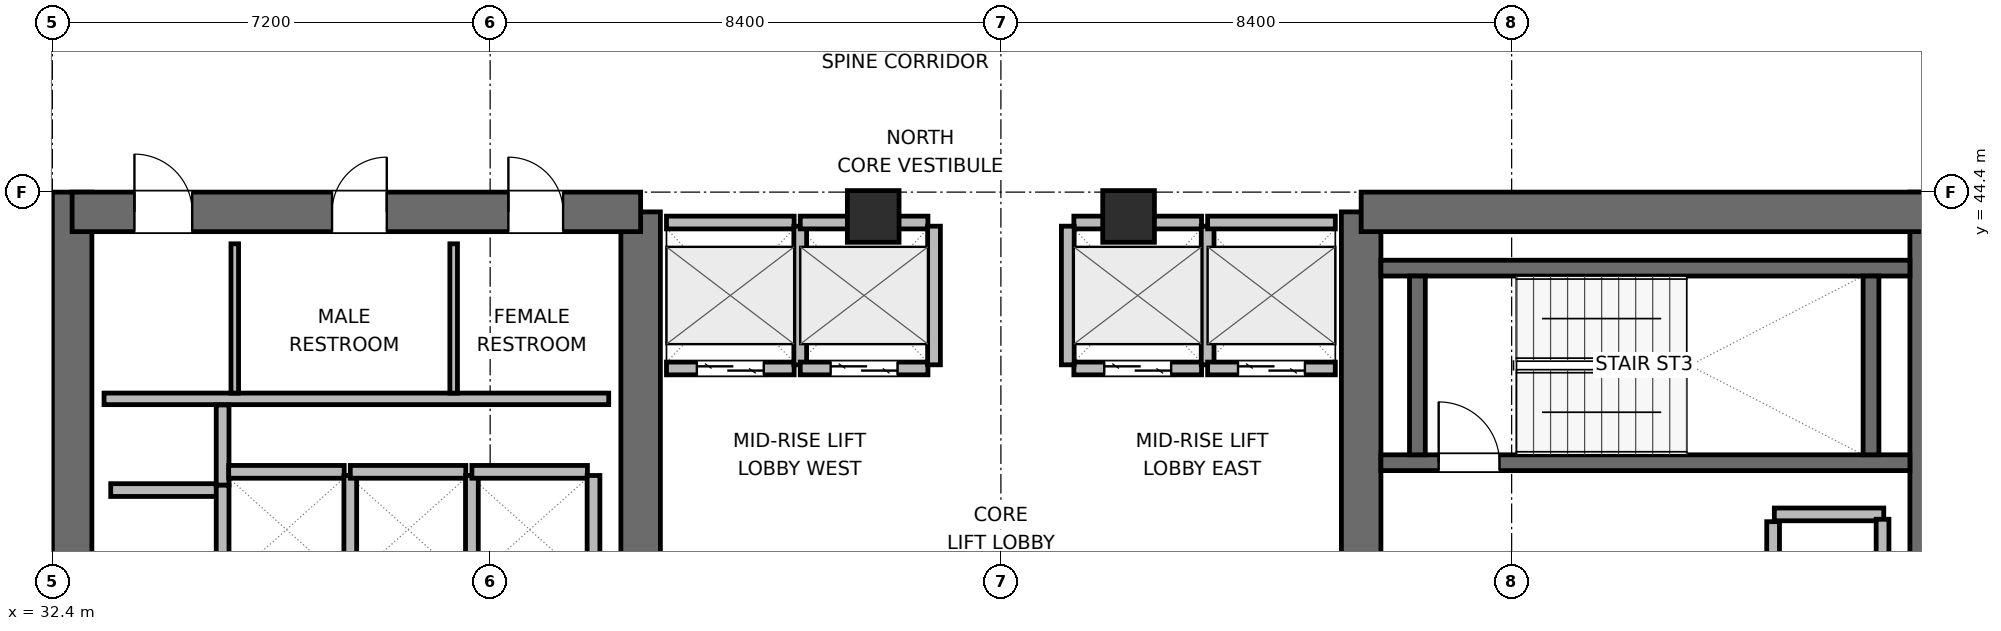
"""IFC4 building model, lengths in metres.
Left out: names, types, materials, properties, quantities, classifications, styles, units other than length and angle.
Written with IfcOpenShell. Run it as: python <this file> out.ifc"""

import sys

from ifc_helpers import new_model, si_unit, direction, frame, frame_2d, origin, origin_2d, place, context, subcontext, project, spatial, rectangle, extrude, element, fill, save


model = new_model("IFC4")
c1 = context("Model", 3, precision=1e-05, world=origin(), true_north=direction((0.0, 1.0)))
c2 = subcontext(c1, "Body", "Model", "MODEL_VIEW")
j1 = project(units=[si_unit("LENGTHUNIT", "METRE"), si_unit("PLANEANGLEUNIT", "RADIAN")], contexts=[c1])
p1 = place(None, origin())
s1 = spatial("IfcSite", under=j1, at=p1, CompositionType="ELEMENT")
p2 = place(p1, origin())
s2 = spatial("IfcBuilding", under=s1, at=p2, CompositionType="ELEMENT")
p3 = place(p2, frame((0.0, 0.0, 190.2)))
s3 = spatial("IfcBuildingStorey", under=s2, at=p3, CompositionType="ELEMENT", Elevation=190.2)
p4 = place(p3, frame((32.725, 27.6, 0.0), z_axis=(0.0, 0.0, 1.0), x_axis=(0.0, 1.0, 0.0)))
e1 = element("IfcWall", 1, at=p4, inside=s3, PredefinedType="SHEAR", context=c2, shape_type="SweptSolid", body=[
    extrude(rectangle(XDim=16.8, YDim=0.65, at=frame_2d((8.4, 0.0))), origin(), (0.0, 0.0, 1.0), 3.9),
])
p5 = place(p3, frame((42.075, 37.8, 0.0), z_axis=(0.0, 0.0, 1.0), x_axis=(0.0, 1.0, 0.0)))
e2 = element("IfcWall", 2, at=p5, inside=s3, PredefinedType="SHEAR", context=c2, shape_type="SweptSolid", body=[
    extrude(rectangle(XDim=6.275, YDim=0.65, at=frame_2d((3.137, 0.0))), origin(), (0.0, 0.0, 1.0), 3.9),
])
p6 = place(p3, frame((32.725, 44.075, 0.0), z_axis=(0.0, 0.0, 1.0), x_axis=(1.0, 0.0, 0.0)))
e3 = element("IfcWall", 3, at=p6, inside=s3, PredefinedType="SHEAR", context=c2, shape_type="SweptSolid", body=[
    extrude(rectangle(XDim=9.35, YDim=0.65, at=frame_2d((4.675, 0.0))), origin(), (0.0, 0.0, 1.0), 3.9),
])
p7 = place(p6, frame((1.025, 0.0, 0.0)))
e4 = element("IfcOpeningElement", 4, at=p7, cuts=e3, PredefinedType="OPENING", context=c2, shape_type="SweptSolid", body=[
    extrude(rectangle(XDim=0.95, YDim=2.04, at=frame_2d((0.475, 1.02))), frame((0.0, 0.335, 0.0), z_axis=(0.0, -1.0, 0.0), x_axis=(1.0, 0.0, 0.0)), (0.0, 0.0, 1.0), 0.67),
])
p8 = place(p6, frame((4.275, 0.0, 0.0)))
e5 = element("IfcOpeningElement", 5, at=p8, cuts=e3, PredefinedType="OPENING", context=c2, shape_type="SweptSolid", body=[
    extrude(rectangle(XDim=0.9, YDim=2.02, at=frame_2d((0.45, 1.01))), frame((0.0, 0.335, 0.0), z_axis=(0.0, -1.0, 0.0), x_axis=(1.0, 0.0, 0.0)), (0.0, 0.0, 1.0), 0.67),
])
p9 = place(p6, frame((7.175, 0.0, 0.0)))
e6 = element("IfcOpeningElement", 6, at=p9, cuts=e3, PredefinedType="OPENING", context=c2, shape_type="SweptSolid", body=[
    extrude(rectangle(XDim=0.9, YDim=2.02, at=frame_2d((0.45, 1.01))), frame((0.0, 0.335, 0.0), z_axis=(0.0, -1.0, 0.0), x_axis=(1.0, 0.0, 0.0)), (0.0, 0.0, 1.0), 0.67),
])
p10 = place(p3, frame((53.925, 38.0, 0.0), z_axis=(0.0, 0.0, 1.0), x_axis=(0.0, 1.0, 0.0)))
e7 = element("IfcWall", 7, at=p10, inside=s3, PredefinedType="SHEAR", context=c2, shape_type="SweptSolid", body=[
    extrude(rectangle(XDim=6.075, YDim=0.65, at=frame_2d((3.038, 0.0))), origin(), (0.0, 0.0, 1.0), 3.9),
])
p11 = place(p3, frame((63.275, 27.6, 0.0), z_axis=(0.0, 0.0, 1.0), x_axis=(0.0, 1.0, 0.0)))
e8 = element("IfcWall", 8, at=p11, inside=s3, PredefinedType="SHEAR", context=c2, shape_type="SweptSolid", body=[
    extrude(rectangle(XDim=16.8, YDim=0.65, at=frame_2d((8.4, 0.0))), origin(), (0.0, 0.0, 1.0), 3.9),
])
p12 = place(p3, frame((53.925, 44.075, 0.0), z_axis=(0.0, 0.0, 1.0), x_axis=(1.0, 0.0, 0.0)))
e9 = element("IfcWall", 9, at=p12, inside=s3, PredefinedType="SHEAR", context=c2, shape_type="SweptSolid", body=[
    extrude(rectangle(XDim=9.35, YDim=0.65, at=frame_2d((4.675, 0.0))), origin(), (0.0, 0.0, 1.0), 3.9),
])
p13 = place(p3, frame((54.25, 39.95, 0.0), z_axis=(0.0, 0.0, 1.0), x_axis=(1.0, 0.0, 0.0)))
e10 = element("IfcWall", 10, at=p13, inside=s3, PredefinedType="SHEAR", context=c2, shape_type="SweptSolid", body=[
    extrude(rectangle(XDim=8.7, YDim=0.26, at=frame_2d((4.35, 0.0))), origin(), (0.0, 0.0, 1.0), 3.9),
])
p14 = place(p13, frame((0.95, 0.0, 0.0)))
e11 = element("IfcOpeningElement", 11, at=p14, cuts=e10, PredefinedType="OPENING", context=c2, shape_type="SweptSolid", body=[
    extrude(rectangle(XDim=1.0, YDim=2.04, at=frame_2d((0.5, 1.02))), frame((0.0, 0.14, 0.0), z_axis=(0.0, -1.0, 0.0), x_axis=(1.0, 0.0, 0.0)), (0.0, 0.0, 1.0), 0.28),
])
p15 = place(p3, frame((54.25, 43.15, 0.0), z_axis=(0.0, 0.0, 1.0), x_axis=(1.0, 0.0, 0.0)))
e12 = element("IfcWall", 12, at=p15, inside=s3, PredefinedType="SHEAR", context=c2, shape_type="SweptSolid", body=[
    extrude(rectangle(XDim=8.7, YDim=0.26, at=frame_2d((4.35, 0.0))), origin(), (0.0, 0.0, 1.0), 3.9),
])
for number, where, z_axis, x_axis in (
    (13, (54.85, 40.08, 0.0), (0.0, 0.0, 1.0), (0.0, 1.0, 0.0)),
    (14, (62.31, 40.08, 0.0), (0.0, 0.0, 1.0), (0.0, 1.0, 0.0)),
):
    element("IfcWall", number, at=place(p3, frame(where, z_axis=z_axis, x_axis=x_axis)), inside=s3, PredefinedType="SHEAR", context=c2, shape_type="SweptSolid", body=[
        extrude(rectangle(XDim=2.94, YDim=0.26, at=frame_2d((1.47, 0.0))), origin(), (0.0, 0.0, 1.0), 3.9),
    ])
for number, where, z_axis, x_axis in (
    (15, (45.9, 44.0, 0.0), (0.0, 0.0, 1.0), (1.0, 0.0, 0.0)),
    (16, (50.1, 44.0, 0.0), (0.0, 0.0, 1.0), (1.0, 0.0, 0.0)),
):
    element("IfcColumn", number, at=place(p3, frame(where, z_axis=z_axis, x_axis=x_axis)), inside=s3, PredefinedType="COLUMN", context=c2, shape_type="SweptSolid", body=[
        extrude(rectangle(XDim=0.85, YDim=0.85, at=origin_2d()), origin(), (0.0, 0.0, 1.0), 3.9),
    ])
p16 = place(p3, frame((33.25, 41.0, 0.0), z_axis=(0.0, 0.0, 1.0), x_axis=(1.0, 0.0, 0.0)))
e17 = element("IfcWall", 17, at=p16, inside=s3, PredefinedType="PLUMBINGWALL", context=c2, shape_type="SweptSolid", body=[
    extrude(rectangle(XDim=8.3, YDim=0.19, at=frame_2d((4.15, 0.0))), origin(), (0.0, 0.0, 1.0), 3.68),
])
for number, where, z_axis, x_axis in (
    (18, (35.4, 41.095, 0.0), (0.0, 0.0, 1.0), (0.0, 1.0, 0.0)),
    (19, (39.0, 41.095, 0.0), (0.0, 0.0, 1.0), (0.0, 1.0, 0.0)),
):
    element("IfcWall", number, at=place(p3, frame(where, z_axis=z_axis, x_axis=x_axis)), inside=s3, PredefinedType="PARTITIONING", context=c2, shape_type="SweptSolid", body=[
        extrude(rectangle(XDim=2.455, YDim=0.125, at=frame_2d((1.228, 0.0))), origin(), (0.0, 0.0, 1.0), 3.68),
    ])
p17 = place(p3, frame((33.36, 39.5, 0.0), z_axis=(0.0, 0.0, 1.0), x_axis=(1.0, 0.0, 0.0)))
e20 = element("IfcWall", 20, at=p17, inside=s3, PredefinedType="PARTITIONING", context=c2, shape_type="SweptSolid", body=[
    extrude(rectangle(XDim=1.86, YDim=0.21, at=frame_2d((0.93, 0.0))), origin(), (0.0, 0.0, 1.0), 3.68),
])
p18 = place(p3, frame((35.2, 39.58, 0.0), z_axis=(0.0, 0.0, 1.0), x_axis=(0.0, 1.0, 0.0)))
e21 = element("IfcWall", 21, at=p18, inside=s3, PredefinedType="PARTITIONING", context=c2, shape_type="SweptSolid", body=[
    extrude(rectangle(XDim=1.32, YDim=0.21, at=frame_2d((0.66, 0.0))), origin(), (0.0, 0.0, 1.0), 3.68),
])
p19 = place(p3, frame((60.72, 39.1, 0.0), z_axis=(0.0, 0.0, 1.0), x_axis=(1.0, 0.0, 0.0)))
e22 = element("IfcWall", 22, at=p19, inside=s3, PredefinedType="PARTITIONING", context=c2, shape_type="SweptSolid", body=[
    extrude(rectangle(XDim=1.8, YDim=0.21, at=frame_2d((0.9, 0.0))), origin(), (0.0, 0.0, 1.0), 3.68),
])
p20 = place(p3, frame((60.7, 37.02, 0.0), z_axis=(0.0, 0.0, 1.0), x_axis=(0.0, 1.0, 0.0)))
e23 = element("IfcWall", 23, at=p20, inside=s3, PredefinedType="PARTITIONING", context=c2, shape_type="SweptSolid", body=[
    extrude(rectangle(XDim=1.96, YDim=0.21, at=frame_2d((0.98, 0.0))), origin(), (0.0, 0.0, 1.0), 3.68),
])
p21 = place(p3, frame((62.5, 36.98, 0.0), z_axis=(0.0, 0.0, 1.0), x_axis=(0.0, 1.0, 0.0)))
e24 = element("IfcWall", 24, at=p21, inside=s3, PredefinedType="PARTITIONING", context=c2, shape_type="SweptSolid", body=[
    extrude(rectangle(XDim=2.04, YDim=0.21, at=frame_2d((1.02, 0.0))), origin(), (0.0, 0.0, 1.0), 3.68),
])
p22 = place(p3, frame((42.5, 41.5, 0.0), z_axis=(0.0, 0.0, 1.0), x_axis=(1.0, 0.0, 0.0)))
e25 = element("IfcWall", 25, at=p22, inside=s3, PredefinedType="PARTITIONING", context=c2, shape_type="SweptSolid", body=[
    extrude(rectangle(XDim=2.1, YDim=0.21, at=frame_2d((1.05, 0.0))), origin(), (0.0, 0.0, 1.0), 3.68),
])
p23 = place(p22, frame((0.5, 0.0, 0.0)))
e26 = element("IfcOpeningElement", 26, at=p23, cuts=e25, PredefinedType="OPENING", context=c2, shape_type="SweptSolid", body=[
    extrude(rectangle(XDim=1.1, YDim=2.04, at=frame_2d((0.55, 1.02))), frame((0.0, 0.115, 0.0), z_axis=(0.0, -1.0, 0.0), x_axis=(1.0, 0.0, 0.0)), (0.0, 0.0, 1.0), 0.23),
])
p24 = place(p3, frame((42.5, 43.9, 0.0), z_axis=(0.0, 0.0, 1.0), x_axis=(1.0, 0.0, 0.0)))
e27 = element("IfcWall", 27, at=p24, inside=s3, PredefinedType="PARTITIONING", context=c2, shape_type="SweptSolid", body=[
    extrude(rectangle(XDim=2.1, YDim=0.21, at=frame_2d((1.05, 0.0))), origin(), (0.0, 0.0, 1.0), 2.765),
])
p25 = place(p3, frame((44.7, 41.56, 0.0), z_axis=(0.0, 0.0, 1.0), x_axis=(0.0, 1.0, 0.0)))
e28 = element("IfcWall", 28, at=p25, inside=s3, PredefinedType="PARTITIONING", context=c2, shape_type="SweptSolid", body=[
    extrude(rectangle(XDim=2.28, YDim=0.21, at=frame_2d((1.14, 0.0))), origin(), (0.0, 0.0, 1.0), 3.68),
])
p26 = place(p3, frame((44.7, 41.5, 0.0), z_axis=(0.0, 0.0, 1.0), x_axis=(1.0, 0.0, 0.0)))
e29 = element("IfcWall", 29, at=p26, inside=s3, PredefinedType="PARTITIONING", context=c2, shape_type="SweptSolid", body=[
    extrude(rectangle(XDim=2.1, YDim=0.21, at=frame_2d((1.05, 0.0))), origin(), (0.0, 0.0, 1.0), 3.68),
])
p27 = place(p26, frame((0.5, 0.0, 0.0)))
e30 = element("IfcOpeningElement", 30, at=p27, cuts=e29, PredefinedType="OPENING", context=c2, shape_type="SweptSolid", body=[
    extrude(rectangle(XDim=1.1, YDim=2.04, at=frame_2d((0.55, 1.02))), frame((0.0, 0.115, 0.0), z_axis=(0.0, -1.0, 0.0), x_axis=(1.0, 0.0, 0.0)), (0.0, 0.0, 1.0), 0.23),
])
p28 = place(p3, frame((44.7, 43.9, 0.0), z_axis=(0.0, 0.0, 1.0), x_axis=(1.0, 0.0, 0.0)))
e31 = element("IfcWall", 31, at=p28, inside=s3, PredefinedType="PARTITIONING", context=c2, shape_type="SweptSolid", body=[
    extrude(rectangle(XDim=2.1, YDim=0.21, at=frame_2d((1.05, 0.0))), origin(), (0.0, 0.0, 1.0), 2.765),
])
p29 = place(p3, frame((46.9, 41.56, 0.0), z_axis=(0.0, 0.0, 1.0), x_axis=(0.0, 1.0, 0.0)))
e32 = element("IfcWall", 32, at=p29, inside=s3, PredefinedType="PARTITIONING", context=c2, shape_type="SweptSolid", body=[
    extrude(rectangle(XDim=2.28, YDim=0.21, at=frame_2d((1.14, 0.0))), origin(), (0.0, 0.0, 1.0), 3.68),
])
p30 = place(p3, frame((49.2, 41.5, 0.0), z_axis=(0.0, 0.0, 1.0), x_axis=(1.0, 0.0, 0.0)))
e33 = element("IfcWall", 33, at=p30, inside=s3, PredefinedType="PARTITIONING", context=c2, shape_type="SweptSolid", body=[
    extrude(rectangle(XDim=2.1, YDim=0.21, at=frame_2d((1.05, 0.0))), origin(), (0.0, 0.0, 1.0), 3.68),
])
p31 = place(p30, frame((0.5, 0.0, 0.0)))
e34 = element("IfcOpeningElement", 34, at=p31, cuts=e33, PredefinedType="OPENING", context=c2, shape_type="SweptSolid", body=[
    extrude(rectangle(XDim=1.1, YDim=2.04, at=frame_2d((0.55, 1.02))), frame((0.0, 0.115, 0.0), z_axis=(0.0, -1.0, 0.0), x_axis=(1.0, 0.0, 0.0)), (0.0, 0.0, 1.0), 0.23),
])
p32 = place(p3, frame((49.2, 43.9, 0.0), z_axis=(0.0, 0.0, 1.0), x_axis=(1.0, 0.0, 0.0)))
e35 = element("IfcWall", 35, at=p32, inside=s3, PredefinedType="PARTITIONING", context=c2, shape_type="SweptSolid", body=[
    extrude(rectangle(XDim=2.1, YDim=0.21, at=frame_2d((1.05, 0.0))), origin(), (0.0, 0.0, 1.0), 2.765),
])
for number, where, z_axis, x_axis in (
    (36, (49.1, 41.56, 0.0), (0.0, 0.0, 1.0), (0.0, 1.0, 0.0)),
    (37, (51.4, 41.56, 0.0), (0.0, 0.0, 1.0), (0.0, 1.0, 0.0)),
):
    element("IfcWall", number, at=place(p3, frame(where, z_axis=z_axis, x_axis=x_axis)), inside=s3, PredefinedType="PARTITIONING", context=c2, shape_type="SweptSolid", body=[
        extrude(rectangle(XDim=2.28, YDim=0.21, at=frame_2d((1.14, 0.0))), origin(), (0.0, 0.0, 1.0), 3.68),
    ])
p33 = place(p3, frame((51.4, 41.5, 0.0), z_axis=(0.0, 0.0, 1.0), x_axis=(1.0, 0.0, 0.0)))
e38 = element("IfcWall", 38, at=p33, inside=s3, PredefinedType="PARTITIONING", context=c2, shape_type="SweptSolid", body=[
    extrude(rectangle(XDim=2.1, YDim=0.21, at=frame_2d((1.05, 0.0))), origin(), (0.0, 0.0, 1.0), 3.68),
])
p34 = place(p33, frame((0.5, 0.0, 0.0)))
e39 = element("IfcOpeningElement", 39, at=p34, cuts=e38, PredefinedType="OPENING", context=c2, shape_type="SweptSolid", body=[
    extrude(rectangle(XDim=1.1, YDim=2.04, at=frame_2d((0.55, 1.02))), frame((0.0, 0.115, 0.0), z_axis=(0.0, -1.0, 0.0), x_axis=(1.0, 0.0, 0.0)), (0.0, 0.0, 1.0), 0.23),
])
p35 = place(p3, frame((51.4, 43.9, 0.0), z_axis=(0.0, 0.0, 1.0), x_axis=(1.0, 0.0, 0.0)))
e40 = element("IfcWall", 40, at=p35, inside=s3, PredefinedType="PARTITIONING", context=c2, shape_type="SweptSolid", body=[
    extrude(rectangle(XDim=2.1, YDim=0.21, at=frame_2d((1.05, 0.0))), origin(), (0.0, 0.0, 1.0), 2.765),
])
p36 = place(p3, frame((35.3, 39.8, 0.0), z_axis=(0.0, 0.0, 1.0), x_axis=(1.0, 0.0, 0.0)))
e41 = element("IfcWall", 41, at=p36, inside=s3, PredefinedType="PARTITIONING", context=c2, shape_type="SweptSolid", body=[
    extrude(rectangle(XDim=1.9, YDim=0.21, at=frame_2d((0.95, 0.0))), origin(), (0.0, 0.0, 1.0), 3.68),
])
p37 = place(p3, frame((35.2, 37.96, 0.0), z_axis=(0.0, 0.0, 1.0), x_axis=(0.0, 1.0, 0.0)))
e42 = element("IfcWall", 42, at=p37, inside=s3, PredefinedType="PARTITIONING", context=c2, shape_type="SweptSolid", body=[
    extrude(rectangle(XDim=1.62, YDim=0.21, at=frame_2d((0.81, 0.0))), origin(), (0.0, 0.0, 1.0), 3.68),
])
p38 = place(p3, frame((37.3, 37.96, 0.0), z_axis=(0.0, 0.0, 1.0), x_axis=(0.0, 1.0, 0.0)))
e43 = element("IfcWall", 43, at=p38, inside=s3, PredefinedType="PARTITIONING", context=c2, shape_type="SweptSolid", body=[
    extrude(rectangle(XDim=1.78, YDim=0.21, at=frame_2d((0.89, 0.0))), origin(), (0.0, 0.0, 1.0), 3.68),
])
p39 = place(p3, frame((37.3, 39.8, 0.0), z_axis=(0.0, 0.0, 1.0), x_axis=(1.0, 0.0, 0.0)))
e44 = element("IfcWall", 44, at=p39, inside=s3, PredefinedType="PARTITIONING", context=c2, shape_type="SweptSolid", body=[
    extrude(rectangle(XDim=1.9, YDim=0.21, at=frame_2d((0.95, 0.0))), origin(), (0.0, 0.0, 1.0), 3.68),
])
p40 = place(p3, frame((39.3, 37.96, 0.0), z_axis=(0.0, 0.0, 1.0), x_axis=(0.0, 1.0, 0.0)))
e45 = element("IfcWall", 45, at=p40, inside=s3, PredefinedType="PARTITIONING", context=c2, shape_type="SweptSolid", body=[
    extrude(rectangle(XDim=1.78, YDim=0.21, at=frame_2d((0.89, 0.0))), origin(), (0.0, 0.0, 1.0), 3.68),
])
p41 = place(p3, frame((39.3, 39.8, 0.0), z_axis=(0.0, 0.0, 1.0), x_axis=(1.0, 0.0, 0.0)))
e46 = element("IfcWall", 46, at=p41, inside=s3, PredefinedType="PARTITIONING", context=c2, shape_type="SweptSolid", body=[
    extrude(rectangle(XDim=1.9, YDim=0.21, at=frame_2d((0.95, 0.0))), origin(), (0.0, 0.0, 1.0), 3.68),
])
p42 = place(p3, frame((41.3, 37.96, 0.0), z_axis=(0.0, 0.0, 1.0), x_axis=(0.0, 1.0, 0.0)))
e47 = element("IfcWall", 47, at=p42, inside=s3, PredefinedType="PARTITIONING", context=c2, shape_type="SweptSolid", body=[
    extrude(rectangle(XDim=1.78, YDim=0.21, at=frame_2d((0.89, 0.0))), origin(), (0.0, 0.0, 1.0), 3.68),
])
p43 = place(p14, origin())
e48 = element("IfcDoor", 48, at=p43, inside=s3, OperationType="SINGLE_SWING_LEFT", PredefinedType="DOOR", context=c2, shape_type="SweptSolid", body=[
    extrude(rectangle(XDim=1.0, YDim=2.04, at=frame_2d((0.5, 1.02))), frame((0.0, 0.025, 0.0), z_axis=(0.0, -1.0, 0.0), x_axis=(1.0, 0.0, 0.0)), (0.0, 0.0, 1.0), 0.05),
])
fill(e11, e48)
p44 = place(p23, origin())
e49 = element("IfcDoor", 49, at=p44, inside=s3, OperationType="DOUBLE_DOOR_SLIDING", PredefinedType="DOOR", context=c2, shape_type="SweptSolid", body=[
    extrude(rectangle(XDim=1.1, YDim=2.04, at=frame_2d((0.55, 1.02))), frame((0.0, 0.025, 0.0), z_axis=(0.0, -1.0, 0.0), x_axis=(1.0, 0.0, 0.0)), (0.0, 0.0, 1.0), 0.05),
])
fill(e26, e49)
p45 = place(p27, origin())
e50 = element("IfcDoor", 50, at=p45, inside=s3, OperationType="DOUBLE_DOOR_SLIDING", PredefinedType="DOOR", context=c2, shape_type="SweptSolid", body=[
    extrude(rectangle(XDim=1.1, YDim=2.04, at=frame_2d((0.55, 1.02))), frame((0.0, 0.025, 0.0), z_axis=(0.0, -1.0, 0.0), x_axis=(1.0, 0.0, 0.0)), (0.0, 0.0, 1.0), 0.05),
])
fill(e30, e50)
p46 = place(p31, origin())
e51 = element("IfcDoor", 51, at=p46, inside=s3, OperationType="DOUBLE_DOOR_SLIDING", PredefinedType="DOOR", context=c2, shape_type="SweptSolid", body=[
    extrude(rectangle(XDim=1.1, YDim=2.04, at=frame_2d((0.55, 1.02))), frame((0.0, 0.025, 0.0), z_axis=(0.0, -1.0, 0.0), x_axis=(1.0, 0.0, 0.0)), (0.0, 0.0, 1.0), 0.05),
])
fill(e34, e51)
p47 = place(p34, origin())
e52 = element("IfcDoor", 52, at=p47, inside=s3, OperationType="DOUBLE_DOOR_SLIDING", PredefinedType="DOOR", context=c2, shape_type="SweptSolid", body=[
    extrude(rectangle(XDim=1.1, YDim=2.04, at=frame_2d((0.55, 1.02))), frame((0.0, 0.025, 0.0), z_axis=(0.0, -1.0, 0.0), x_axis=(1.0, 0.0, 0.0)), (0.0, 0.0, 1.0), 0.05),
])
fill(e39, e52)
p48 = place(p7, origin())
e53 = element("IfcDoor", 53, at=p48, inside=s3, OperationType="SINGLE_SWING_LEFT", PredefinedType="DOOR", context=c2, shape_type="SweptSolid", body=[
    extrude(rectangle(XDim=0.95, YDim=2.04, at=frame_2d((0.475, 1.02))), frame((0.0, 0.025, 0.0), z_axis=(0.0, -1.0, 0.0), x_axis=(1.0, 0.0, 0.0)), (0.0, 0.0, 1.0), 0.05),
])
fill(e4, e53)
p49 = place(p8, origin())
e54 = element("IfcDoor", 54, at=p49, inside=s3, OperationType="SINGLE_SWING_RIGHT", PredefinedType="DOOR", context=c2, shape_type="SweptSolid", body=[
    extrude(rectangle(XDim=0.9, YDim=2.02, at=frame_2d((0.45, 1.01))), frame((0.0, 0.025, 0.0), z_axis=(0.0, -1.0, 0.0), x_axis=(1.0, 0.0, 0.0)), (0.0, 0.0, 1.0), 0.05),
])
fill(e5, e54)
p50 = place(p9, origin())
e55 = element("IfcDoor", 55, at=p50, inside=s3, OperationType="SINGLE_SWING_LEFT", PredefinedType="DOOR", context=c2, shape_type="SweptSolid", body=[
    extrude(rectangle(XDim=0.9, YDim=2.02, at=frame_2d((0.45, 1.01))), frame((0.0, 0.025, 0.0), z_axis=(0.0, -1.0, 0.0), x_axis=(1.0, 0.0, 0.0)), (0.0, 0.0, 1.0), 0.05),
])
fill(e6, e55)
save(model, sys.argv[1])
